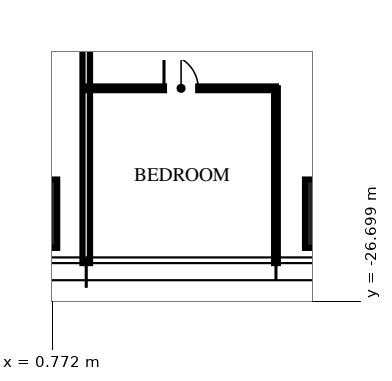
"""IFC4 building model, lengths in metres.
Left out: names, types, materials, properties, quantities, classifications, styles, units other than length and angle.
Written with IfcOpenShell. Run it as: python <this file> out.ifc"""

import sys

from ifc_helpers import new_model, si_unit, direction, frame, frame_2d, origin, origin_2d, place, context, subcontext, project, spatial, rectangle, extrude, element, fill, save


model = new_model("IFC4")
c1 = context("Model", 3, precision=1e-05, world=origin(), true_north=direction((0.0, 1.0)))
c2 = subcontext(c1, "Body", "Model", "MODEL_VIEW")
j1 = project(units=[si_unit("LENGTHUNIT", "METRE"), si_unit("PLANEANGLEUNIT", "RADIAN")], contexts=[c1])
p1 = place(None, origin())
s1 = spatial("IfcSite", under=j1, at=p1, CompositionType="ELEMENT")
p2 = place(p1, origin())
s2 = spatial("IfcBuilding", under=s1, at=p2, CompositionType="ELEMENT")
p3 = place(p2, frame((0.0, 0.0, 252.0)))
s3 = spatial("IfcBuildingStorey", under=s2, at=p3, CompositionType="ELEMENT", Elevation=252.0)
for number, where, z_axis, x_axis in (
    (1, (8.32, -24.4, 0.0), (0.0, 0.0, 1.0), (1.0, 0.0, 0.0)),
    (2, (0.0, -24.4, 0.0), (0.0, 0.0, 1.0), (1.0, 0.0, 0.0)),
):
    element("IfcColumn", number, at=place(p3, frame(where, z_axis=z_axis, x_axis=x_axis)), inside=s3, PredefinedType="COLUMN", context=c2, shape_type="SweptSolid", body=[
        extrude(rectangle(XDim=1.8, YDim=1.8, at=origin_2d()), origin(), (0.0, 0.0, 1.0), 3.75),
    ])
p4 = place(p3, frame((1.664, -12.8, 0.0), z_axis=(0.0, 0.0, 1.0), x_axis=(0.0, -1.0, 0.0)))
e3 = element("IfcWall", 3, at=p4, inside=s3, PredefinedType="PARTITIONING", context=c2, shape_type="SweptSolid", body=[
    extrude(rectangle(XDim=12.9, YDim=0.2, at=frame_2d((6.45, 0.0))), origin(), (0.0, 0.0, 1.0), 2.91),
])
p5 = place(p3, frame((6.656, -21.1, 0.0), z_axis=(0.0, 0.0, 1.0), x_axis=(0.0, -1.0, 0.0)))
e4 = element("IfcWall", 4, at=p5, inside=s3, PredefinedType="PARTITIONING", context=c2, shape_type="SweptSolid", body=[
    extrude(rectangle(XDim=4.6, YDim=0.1, at=frame_2d((2.3, 0.0))), origin(), (0.0, 0.0, 1.0), 2.91),
])
p6 = place(p3, frame((1.664, -21.1, 0.0), z_axis=(0.0, 0.0, 1.0), x_axis=(1.0, 0.0, 0.0)))
e5 = element("IfcWall", 5, at=p6, inside=s3, PredefinedType="PARTITIONING", context=c2, shape_type="SweptSolid", body=[
    extrude(rectangle(XDim=4.992, YDim=0.1, at=frame_2d((2.496, 0.0))), origin(), (0.0, 0.0, 1.0), 2.81),
])
p7 = place(p6, frame((2.046, 0.0, 0.0)))
e6 = element("IfcOpeningElement", 6, at=p7, cuts=e5, PredefinedType="OPENING", context=c2, shape_type="SweptSolid", body=[
    extrude(rectangle(XDim=0.9, YDim=2.1, at=frame_2d((0.45, 1.05))), frame((0.0, 0.06, 0.0), z_axis=(0.0, -1.0, 0.0), x_axis=(1.0, 0.0, 0.0)), (0.0, 0.0, 1.0), 0.12),
])
p8 = place(p7, origin())
e7 = element("IfcDoor", 7, at=p8, inside=s3, OperationType="SINGLE_SWING_LEFT", PredefinedType="DOOR", context=c2, shape_type="SweptSolid", body=[
    extrude(rectangle(XDim=0.9, YDim=2.1, at=frame_2d((0.45, 1.05))), frame((0.0, 0.025, 0.0), z_axis=(0.0, -1.0, 0.0), x_axis=(1.0, 0.0, 0.0)), (0.0, 0.0, 1.0), 0.05),
])
fill(e6, e7)
save(model, sys.argv[1])
